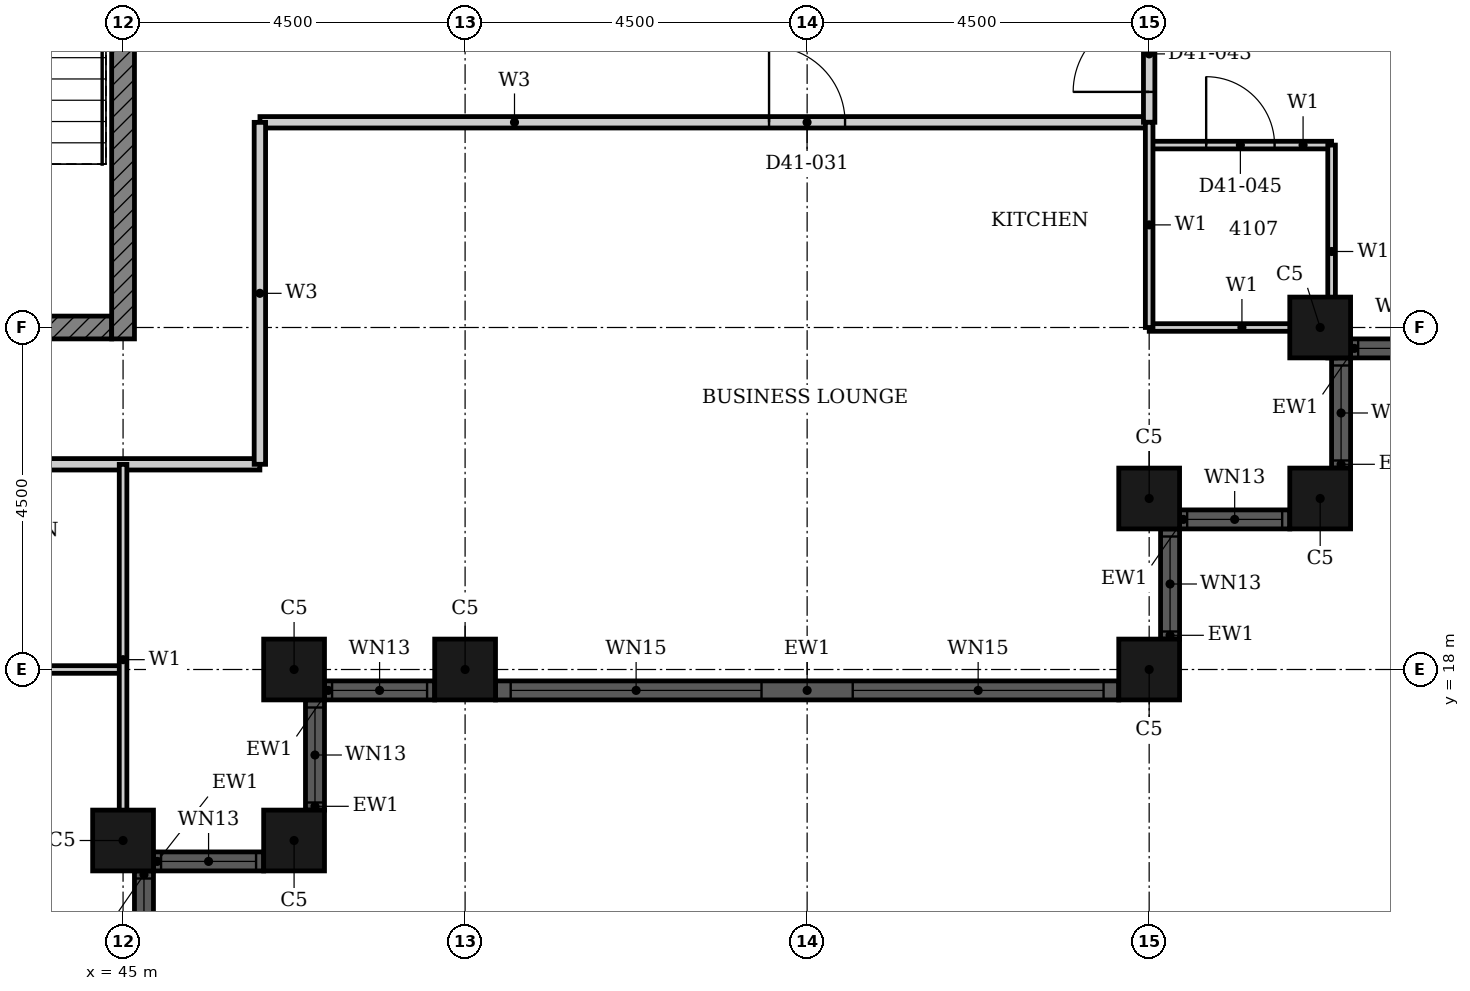
"""IFC4 building model, lengths in metres.
Left out: names, types, materials, properties, quantities, classifications, styles, units other than length and angle.
Written with IfcOpenShell. Run it as: python <this file> out.ifc"""

import sys

from ifc_helpers import new_model, si_unit, direction, frame, frame_2d, origin, origin_2d, place, context, subcontext, project, spatial, rectangle, hollow_rectangle, extrude, element, fill, save


model = new_model("IFC4")
c1 = context("Model", 3, precision=1e-05, world=origin(), true_north=direction((0.0, 1.0)))
c2 = subcontext(c1, "Body", "Model", "MODEL_VIEW")
j1 = project(units=[si_unit("LENGTHUNIT", "METRE"), si_unit("PLANEANGLEUNIT", "RADIAN")], contexts=[c1])
p1 = place(None, origin())
s1 = spatial("IfcSite", under=j1, at=p1, CompositionType="ELEMENT")
p2 = place(p1, origin())
s2 = spatial("IfcBuilding", under=s1, at=p2, CompositionType="ELEMENT")
p3 = place(p2, frame((0.0, 0.0, 165.4)))
s3 = spatial("IfcBuildingStorey", under=s2, at=p3, CompositionType="ELEMENT", Elevation=165.4)
for number, where, z_axis, x_axis in (
    (1, (45.0, 15.75, 0.0), (0.0, 0.0, 1.0), (1.0, 0.0, 0.0)),
    (2, (47.25, 15.75, 0.0), (0.0, 0.0, 1.0), (1.0, 0.0, 0.0)),
    (3, (47.25, 18.0, 0.0), (0.0, 0.0, 1.0), (1.0, 0.0, 0.0)),
    (4, (49.5, 18.0, 0.0), (0.0, 0.0, 1.0), (1.0, 0.0, 0.0)),
    (5, (58.5, 18.0, 0.0), (0.0, 0.0, 1.0), (1.0, 0.0, 0.0)),
    (6, (58.5, 20.25, 0.0), (0.0, 0.0, 1.0), (1.0, 0.0, 0.0)),
    (7, (60.75, 20.25, 0.0), (0.0, 0.0, 1.0), (1.0, 0.0, 0.0)),
    (8, (60.75, 22.5, 0.0), (0.0, 0.0, 1.0), (1.0, 0.0, 0.0)),
):
    element("IfcColumn", number, at=place(p3, frame(where, z_axis=z_axis, x_axis=x_axis)), inside=s3, PredefinedType="COLUMN", context=c2, shape_type="SweptSolid", body=[
        extrude(hollow_rectangle(XDim=0.8, YDim=0.8, WallThickness=0.025, at=origin_2d()), origin(), (0.0, 0.0, 1.0), 3.7),
    ])
p4 = place(p3, frame((45.275, 13.9, 0.0), z_axis=(0.0, 0.0, 1.0), x_axis=(0.0, 1.0, 0.0)))
e9 = element("IfcWall", 9, at=p4, inside=s3, PredefinedType="SOLIDWALL", context=c2, shape_type="SweptSolid", body=[
    extrude(rectangle(XDim=1.45, YDim=0.25, at=frame_2d((0.725, 0.0))), origin(), (0.0, 0.0, 1.0), 3.7),
])
p5 = place(p4, frame((0.1, 0.0, 0.9)))
e10 = element("IfcOpeningElement", 10, at=p5, cuts=e9, PredefinedType="OPENING", context=c2, shape_type="SweptSolid", body=[
    extrude(rectangle(XDim=1.25, YDim=1.85, at=frame_2d((0.625, 0.925))), frame((0.0, 0.135, 0.0), z_axis=(0.0, -1.0, 0.0), x_axis=(1.0, 0.0, 0.0)), (0.0, 0.0, 1.0), 0.27),
])
p6 = place(p3, frame((45.4, 15.475, 0.0), z_axis=(0.0, 0.0, 1.0), x_axis=(1.0, 0.0, 0.0)))
e11 = element("IfcWall", 11, at=p6, inside=s3, PredefinedType="SOLIDWALL", context=c2, shape_type="SweptSolid", body=[
    extrude(rectangle(XDim=1.45, YDim=0.25, at=frame_2d((0.725, 0.0))), origin(), (0.0, 0.0, 1.0), 3.7),
])
p7 = place(p6, frame((0.1, 0.0, 0.9)))
e12 = element("IfcOpeningElement", 12, at=p7, cuts=e11, PredefinedType="OPENING", context=c2, shape_type="SweptSolid", body=[
    extrude(rectangle(XDim=1.25, YDim=1.85, at=frame_2d((0.625, 0.925))), frame((0.0, 0.135, 0.0), z_axis=(0.0, -1.0, 0.0), x_axis=(1.0, 0.0, 0.0)), (0.0, 0.0, 1.0), 0.27),
])
p8 = place(p3, frame((47.525, 16.15, 0.0), z_axis=(0.0, 0.0, 1.0), x_axis=(0.0, 1.0, 0.0)))
e13 = element("IfcWall", 13, at=p8, inside=s3, PredefinedType="SOLIDWALL", context=c2, shape_type="SweptSolid", body=[
    extrude(rectangle(XDim=1.45, YDim=0.25, at=frame_2d((0.725, 0.0))), origin(), (0.0, 0.0, 1.0), 3.7),
])
p9 = place(p8, frame((0.1, 0.0, 0.9)))
e14 = element("IfcOpeningElement", 14, at=p9, cuts=e13, PredefinedType="OPENING", context=c2, shape_type="SweptSolid", body=[
    extrude(rectangle(XDim=1.25, YDim=1.85, at=frame_2d((0.625, 0.925))), frame((0.0, 0.135, 0.0), z_axis=(0.0, -1.0, 0.0), x_axis=(1.0, 0.0, 0.0)), (0.0, 0.0, 1.0), 0.27),
])
p10 = place(p3, frame((47.65, 17.725, 0.0), z_axis=(0.0, 0.0, 1.0), x_axis=(1.0, 0.0, 0.0)))
e15 = element("IfcWall", 15, at=p10, inside=s3, PredefinedType="SOLIDWALL", context=c2, shape_type="SweptSolid", body=[
    extrude(rectangle(XDim=1.45, YDim=0.25, at=frame_2d((0.725, 0.0))), origin(), (0.0, 0.0, 1.0), 3.7),
])
p11 = place(p10, frame((0.1, 0.0, 0.9)))
e16 = element("IfcOpeningElement", 16, at=p11, cuts=e15, PredefinedType="OPENING", context=c2, shape_type="SweptSolid", body=[
    extrude(rectangle(XDim=1.25, YDim=1.85, at=frame_2d((0.625, 0.925))), frame((0.0, 0.135, 0.0), z_axis=(0.0, -1.0, 0.0), x_axis=(1.0, 0.0, 0.0)), (0.0, 0.0, 1.0), 0.27),
])
p12 = place(p3, frame((49.9, 17.725, 0.0), z_axis=(0.0, 0.0, 1.0), x_axis=(1.0, 0.0, 0.0)))
e17 = element("IfcWall", 17, at=p12, inside=s3, PredefinedType="SOLIDWALL", context=c2, shape_type="SweptSolid", body=[
    extrude(rectangle(XDim=8.2, YDim=0.25, at=frame_2d((4.1, 0.0))), origin(), (0.0, 0.0, 1.0), 3.7),
])
p13 = place(p12, frame((0.2, 0.0, 0.45)))
e18 = element("IfcOpeningElement", 18, at=p13, cuts=e17, PredefinedType="OPENING", context=c2, shape_type="SweptSolid", body=[
    extrude(rectangle(XDim=3.3, YDim=2.3, at=frame_2d((1.65, 1.15))), frame((0.0, 0.135, 0.0), z_axis=(0.0, -1.0, 0.0), x_axis=(1.0, 0.0, 0.0)), (0.0, 0.0, 1.0), 0.27),
])
p14 = place(p12, frame((4.7, 0.0, 0.45)))
e19 = element("IfcOpeningElement", 19, at=p14, cuts=e17, PredefinedType="OPENING", context=c2, shape_type="SweptSolid", body=[
    extrude(rectangle(XDim=3.3, YDim=2.3, at=frame_2d((1.65, 1.15))), frame((0.0, 0.135, 0.0), z_axis=(0.0, -1.0, 0.0), x_axis=(1.0, 0.0, 0.0)), (0.0, 0.0, 1.0), 0.27),
])
p15 = place(p3, frame((58.775, 18.4, 0.0), z_axis=(0.0, 0.0, 1.0), x_axis=(0.0, 1.0, 0.0)))
e20 = element("IfcWall", 20, at=p15, inside=s3, PredefinedType="SOLIDWALL", context=c2, shape_type="SweptSolid", body=[
    extrude(rectangle(XDim=1.45, YDim=0.25, at=frame_2d((0.725, 0.0))), origin(), (0.0, 0.0, 1.0), 3.7),
])
p16 = place(p15, frame((0.1, 0.0, 0.9)))
e21 = element("IfcOpeningElement", 21, at=p16, cuts=e20, PredefinedType="OPENING", context=c2, shape_type="SweptSolid", body=[
    extrude(rectangle(XDim=1.25, YDim=1.85, at=frame_2d((0.625, 0.925))), frame((0.0, 0.135, 0.0), z_axis=(0.0, -1.0, 0.0), x_axis=(1.0, 0.0, 0.0)), (0.0, 0.0, 1.0), 0.27),
])
p17 = place(p3, frame((58.9, 19.975, 0.0), z_axis=(0.0, 0.0, 1.0), x_axis=(1.0, 0.0, 0.0)))
e22 = element("IfcWall", 22, at=p17, inside=s3, PredefinedType="SOLIDWALL", context=c2, shape_type="SweptSolid", body=[
    extrude(rectangle(XDim=1.45, YDim=0.25, at=frame_2d((0.725, 0.0))), origin(), (0.0, 0.0, 1.0), 3.7),
])
p18 = place(p17, frame((0.1, 0.0, 0.9)))
e23 = element("IfcOpeningElement", 23, at=p18, cuts=e22, PredefinedType="OPENING", context=c2, shape_type="SweptSolid", body=[
    extrude(rectangle(XDim=1.25, YDim=1.85, at=frame_2d((0.625, 0.925))), frame((0.0, 0.135, 0.0), z_axis=(0.0, -1.0, 0.0), x_axis=(1.0, 0.0, 0.0)), (0.0, 0.0, 1.0), 0.27),
])
p19 = place(p3, frame((61.025, 20.65, 0.0), z_axis=(0.0, 0.0, 1.0), x_axis=(0.0, 1.0, 0.0)))
e24 = element("IfcWall", 24, at=p19, inside=s3, PredefinedType="SOLIDWALL", context=c2, shape_type="SweptSolid", body=[
    extrude(rectangle(XDim=1.45, YDim=0.25, at=frame_2d((0.725, 0.0))), origin(), (0.0, 0.0, 1.0), 3.7),
])
p20 = place(p19, frame((0.1, 0.0, 0.9)))
e25 = element("IfcOpeningElement", 25, at=p20, cuts=e24, PredefinedType="OPENING", context=c2, shape_type="SweptSolid", body=[
    extrude(rectangle(XDim=1.25, YDim=1.85, at=frame_2d((0.625, 0.925))), frame((0.0, 0.135, 0.0), z_axis=(0.0, -1.0, 0.0), x_axis=(1.0, 0.0, 0.0)), (0.0, 0.0, 1.0), 0.27),
])
p21 = place(p3, frame((61.15, 22.225, 0.0), z_axis=(0.0, 0.0, 1.0), x_axis=(1.0, 0.0, 0.0)))
e26 = element("IfcWall", 26, at=p21, inside=s3, PredefinedType="SOLIDWALL", context=c2, shape_type="SweptSolid", body=[
    extrude(rectangle(XDim=1.45, YDim=0.25, at=frame_2d((0.725, 0.0))), origin(), (0.0, 0.0, 1.0), 3.7),
])
p22 = place(p21, frame((0.1, 0.0, 0.9)))
e27 = element("IfcOpeningElement", 27, at=p22, cuts=e26, PredefinedType="OPENING", context=c2, shape_type="SweptSolid", body=[
    extrude(rectangle(XDim=1.25, YDim=1.85, at=frame_2d((0.625, 0.925))), frame((0.0, 0.135, 0.0), z_axis=(0.0, -1.0, 0.0), x_axis=(1.0, 0.0, 0.0)), (0.0, 0.0, 1.0), 0.27),
])
p23 = place(p3, frame((32.911, 22.5, 0.0), z_axis=(0.0, 0.0, 1.0), x_axis=(1.0, 0.0, 0.0)))
e28 = element("IfcWall", 28, at=p23, inside=s3, PredefinedType="SHEAR", context=c2, shape_type="SweptSolid", body=[
    extrude(rectangle(XDim=11.939, YDim=0.3, at=frame_2d((5.97, 0.0))), origin(), (0.0, 0.0, 1.0), 3.4),
])
p24 = place(p23, frame((5.404, 0.0, 0.0)))
e29 = element("IfcOpeningElement", 29, at=p24, cuts=e28, PredefinedType="OPENING", context=c2, shape_type="SweptSolid", body=[
    extrude(rectangle(XDim=1.8, YDim=2.1, at=frame_2d((0.9, 1.05))), frame((0.0, 0.16, 0.0), z_axis=(0.0, -1.0, 0.0), x_axis=(1.0, 0.0, 0.0)), (0.0, 0.0, 1.0), 0.32),
])
p25 = place(p3, frame((45.0, 22.35, 0.0), z_axis=(0.0, 0.0, 1.0), x_axis=(0.0, 1.0, 0.0)))
e30 = element("IfcWall", 30, at=p25, inside=s3, PredefinedType="SHEAR", context=c2, shape_type="SweptSolid", body=[
    extrude(rectangle(XDim=9.3, YDim=0.3, at=frame_2d((4.65, 0.0))), origin(), (0.0, 0.0, 1.0), 3.4),
])
p26 = place(p3, frame((38.4, 20.7, 0.0), z_axis=(0.0, 0.0, 1.0), x_axis=(1.0, 0.0, 0.0)))
e31 = element("IfcWall", 31, at=p26, inside=s3, PredefinedType="PARTITIONING", context=c2, shape_type="SweptSolid", body=[
    extrude(rectangle(XDim=8.4, YDim=0.15, at=frame_2d((4.2, 0.0))), origin(), (0.0, 0.0, 1.0), 3.4),
])
p27 = place(p3, frame((46.801, 25.2, 0.0), z_axis=(0.0, 0.0, 1.0), x_axis=(1.0, 0.0, 0.0)))
e32 = element("IfcWall", 32, at=p27, inside=s3, PredefinedType="PARTITIONING", context=c2, shape_type="SweptSolid", body=[
    extrude(rectangle(XDim=11.699, YDim=0.15, at=frame_2d((5.85, 0.0))), origin(), (0.0, 0.0, 1.0), 3.4),
])
p28 = place(p27, frame((6.698, 0.0, 0.0)))
e33 = element("IfcOpeningElement", 33, at=p28, cuts=e32, PredefinedType="OPENING", context=c2, shape_type="SweptSolid", body=[
    extrude(rectangle(XDim=1.0, YDim=2.1, at=frame_2d((0.5, 1.05))), frame((0.0, 0.085, 0.0), z_axis=(0.0, -1.0, 0.0), x_axis=(1.0, 0.0, 0.0)), (0.0, 0.0, 1.0), 0.17),
])
p29 = place(p3, frame((46.8, 20.7, 0.0), z_axis=(0.0, 0.0, 1.0), x_axis=(0.0, 1.0, 0.0)))
e34 = element("IfcWall", 34, at=p29, inside=s3, PredefinedType="PARTITIONING", context=c2, shape_type="SweptSolid", body=[
    extrude(rectangle(XDim=4.499, YDim=0.15, at=frame_2d((2.25, 0.0))), origin(), (0.0, 0.0, 1.0), 3.4),
])
p30 = place(p3, frame((58.5, 25.2, 0.0), z_axis=(0.0, 0.0, 1.0), x_axis=(0.0, 1.0, 0.0)))
e35 = element("IfcWall", 35, at=p30, inside=s3, PredefinedType="PARTITIONING", context=c2, shape_type="SweptSolid", body=[
    extrude(rectangle(XDim=1.8, YDim=0.15, at=frame_2d((0.9, 0.0))), origin(), (0.0, 0.0, 1.0), 3.4),
])
p31 = place(p30, frame((0.4, 0.0, 0.0)))
e36 = element("IfcOpeningElement", 36, at=p31, cuts=e35, PredefinedType="OPENING", context=c2, shape_type="SweptSolid", body=[
    extrude(rectangle(XDim=1.0, YDim=2.2, at=frame_2d((0.5, 1.1))), frame((0.0, 0.085, 0.0), z_axis=(0.0, -1.0, 0.0), x_axis=(1.0, 0.0, 0.0)), (0.0, 0.0, 1.0), 0.17),
])
p32 = place(p3, frame((42.0, 18.0, 0.0), z_axis=(0.0, 0.0, 1.0), x_axis=(1.0, 0.0, 0.0)))
e37 = element("IfcWall", 37, at=p32, inside=s3, PredefinedType="PARTITIONING", context=c2, shape_type="SweptSolid", body=[
    extrude(rectangle(XDim=3.0, YDim=0.1, at=frame_2d((1.5, 0.0))), origin(), (0.0, 0.0, 1.0), 3.4),
])
p33 = place(p32, frame((1.05, 0.0, 0.0)))
e38 = element("IfcOpeningElement", 38, at=p33, cuts=e37, PredefinedType="OPENING", context=c2, shape_type="SweptSolid", body=[
    extrude(rectangle(XDim=0.9, YDim=2.1, at=frame_2d((0.45, 1.05))), frame((0.0, 0.06, 0.0), z_axis=(0.0, -1.0, 0.0), x_axis=(1.0, 0.0, 0.0)), (0.0, 0.0, 1.0), 0.12),
])
p34 = place(p3, frame((58.501, 22.5, 0.0), z_axis=(0.0, 0.0, 1.0), x_axis=(1.0, 0.0, 0.0)))
e39 = element("IfcWall", 39, at=p34, inside=s3, PredefinedType="PARTITIONING", context=c2, shape_type="SweptSolid", body=[
    extrude(rectangle(XDim=2.439, YDim=0.1, at=frame_2d((1.219, 0.0))), origin(), (0.0, 0.0, 1.0), 2.68),
])
p35 = place(p3, frame((58.5, 24.9, 0.0), z_axis=(0.0, 0.0, 1.0), x_axis=(1.0, 0.0, 0.0)))
e40 = element("IfcWall", 40, at=p35, inside=s3, PredefinedType="PARTITIONING", context=c2, shape_type="SweptSolid", body=[
    extrude(rectangle(XDim=2.4, YDim=0.1, at=frame_2d((1.2, 0.0))), origin(), (0.0, 0.0, 1.0), 3.4),
])
p36 = place(p35, frame((0.75, 0.0, 0.0)))
e41 = element("IfcOpeningElement", 41, at=p36, cuts=e40, PredefinedType="OPENING", context=c2, shape_type="SweptSolid", body=[
    extrude(rectangle(XDim=0.9, YDim=2.1, at=frame_2d((0.45, 1.05))), frame((0.0, 0.06, 0.0), z_axis=(0.0, -1.0, 0.0), x_axis=(1.0, 0.0, 0.0)), (0.0, 0.0, 1.0), 0.12),
])
p37 = place(p3, frame((45.0, 15.56, 0.0), z_axis=(0.0, 0.0, 1.0), x_axis=(0.0, 1.0, 0.0)))
e42 = element("IfcWall", 42, at=p37, inside=s3, PredefinedType="PARTITIONING", context=c2, shape_type="SweptSolid", body=[
    extrude(rectangle(XDim=5.139, YDim=0.1, at=frame_2d((2.569, 0.0))), origin(), (0.0, 0.0, 1.0), 3.4),
])
p38 = place(p3, frame((58.5, 22.5, 0.0), z_axis=(0.0, 0.0, 1.0), x_axis=(0.0, 1.0, 0.0)))
e43 = element("IfcWall", 43, at=p38, inside=s3, PredefinedType="PARTITIONING", context=c2, shape_type="SweptSolid", body=[
    extrude(rectangle(XDim=2.7, YDim=0.1, at=frame_2d((1.35, 0.0))), origin(), (0.0, 0.0, 1.0), 3.4),
])
p39 = place(p3, frame((60.9, 22.1, 0.0), z_axis=(0.0, 0.0, 1.0), x_axis=(0.0, 1.0, 0.0)))
e44 = element("IfcWall", 44, at=p39, inside=s3, PredefinedType="PARTITIONING", context=c2, shape_type="SweptSolid", body=[
    extrude(rectangle(XDim=2.8, YDim=0.1, at=frame_2d((1.4, 0.0))), origin(), (0.0, 0.0, 1.0), 3.4),
])
p40 = place(p5, origin())
e45 = element("IfcWindow", 45, at=p40, inside=s3, PartitioningType="SINGLE_PANEL", PredefinedType="WINDOW", context=c2, shape_type="SweptSolid", body=[
    extrude(rectangle(XDim=1.25, YDim=1.85, at=frame_2d((0.625, 0.925))), frame((0.0, 0.03, 0.0), z_axis=(0.0, -1.0, 0.0), x_axis=(1.0, 0.0, 0.0)), (0.0, 0.0, 1.0), 0.06),
])
fill(e10, e45)
p41 = place(p7, origin())
e46 = element("IfcWindow", 46, at=p41, inside=s3, PartitioningType="SINGLE_PANEL", PredefinedType="WINDOW", context=c2, shape_type="SweptSolid", body=[
    extrude(rectangle(XDim=1.25, YDim=1.85, at=frame_2d((0.625, 0.925))), frame((0.0, 0.03, 0.0), z_axis=(0.0, -1.0, 0.0), x_axis=(1.0, 0.0, 0.0)), (0.0, 0.0, 1.0), 0.06),
])
fill(e12, e46)
p42 = place(p9, origin())
e47 = element("IfcWindow", 47, at=p42, inside=s3, PartitioningType="SINGLE_PANEL", PredefinedType="WINDOW", context=c2, shape_type="SweptSolid", body=[
    extrude(rectangle(XDim=1.25, YDim=1.85, at=frame_2d((0.625, 0.925))), frame((0.0, 0.03, 0.0), z_axis=(0.0, -1.0, 0.0), x_axis=(1.0, 0.0, 0.0)), (0.0, 0.0, 1.0), 0.06),
])
fill(e14, e47)
p43 = place(p11, origin())
e48 = element("IfcWindow", 48, at=p43, inside=s3, PartitioningType="SINGLE_PANEL", PredefinedType="WINDOW", context=c2, shape_type="SweptSolid", body=[
    extrude(rectangle(XDim=1.25, YDim=1.85, at=frame_2d((0.625, 0.925))), frame((0.0, 0.03, 0.0), z_axis=(0.0, -1.0, 0.0), x_axis=(1.0, 0.0, 0.0)), (0.0, 0.0, 1.0), 0.06),
])
fill(e16, e48)
p44 = place(p13, origin())
e49 = element("IfcWindow", 49, at=p44, inside=s3, PartitioningType="SINGLE_PANEL", PredefinedType="WINDOW", context=c2, shape_type="SweptSolid", body=[
    extrude(rectangle(XDim=3.3, YDim=2.3, at=frame_2d((1.65, 1.15))), frame((0.0, 0.03, 0.0), z_axis=(0.0, -1.0, 0.0), x_axis=(1.0, 0.0, 0.0)), (0.0, 0.0, 1.0), 0.06),
])
fill(e18, e49)
p45 = place(p14, origin())
e50 = element("IfcWindow", 50, at=p45, inside=s3, PartitioningType="SINGLE_PANEL", PredefinedType="WINDOW", context=c2, shape_type="SweptSolid", body=[
    extrude(rectangle(XDim=3.3, YDim=2.3, at=frame_2d((1.65, 1.15))), frame((0.0, 0.03, 0.0), z_axis=(0.0, -1.0, 0.0), x_axis=(1.0, 0.0, 0.0)), (0.0, 0.0, 1.0), 0.06),
])
fill(e19, e50)
p46 = place(p16, origin())
e51 = element("IfcWindow", 51, at=p46, inside=s3, PartitioningType="SINGLE_PANEL", PredefinedType="WINDOW", context=c2, shape_type="SweptSolid", body=[
    extrude(rectangle(XDim=1.25, YDim=1.85, at=frame_2d((0.625, 0.925))), frame((0.0, 0.03, 0.0), z_axis=(0.0, -1.0, 0.0), x_axis=(1.0, 0.0, 0.0)), (0.0, 0.0, 1.0), 0.06),
])
fill(e21, e51)
p47 = place(p18, origin())
e52 = element("IfcWindow", 52, at=p47, inside=s3, PartitioningType="SINGLE_PANEL", PredefinedType="WINDOW", context=c2, shape_type="SweptSolid", body=[
    extrude(rectangle(XDim=1.25, YDim=1.85, at=frame_2d((0.625, 0.925))), frame((0.0, 0.03, 0.0), z_axis=(0.0, -1.0, 0.0), x_axis=(1.0, 0.0, 0.0)), (0.0, 0.0, 1.0), 0.06),
])
fill(e23, e52)
p48 = place(p20, origin())
e53 = element("IfcWindow", 53, at=p48, inside=s3, PartitioningType="SINGLE_PANEL", PredefinedType="WINDOW", context=c2, shape_type="SweptSolid", body=[
    extrude(rectangle(XDim=1.25, YDim=1.85, at=frame_2d((0.625, 0.925))), frame((0.0, 0.03, 0.0), z_axis=(0.0, -1.0, 0.0), x_axis=(1.0, 0.0, 0.0)), (0.0, 0.0, 1.0), 0.06),
])
fill(e25, e53)
p49 = place(p22, origin())
e54 = element("IfcWindow", 54, at=p49, inside=s3, PartitioningType="SINGLE_PANEL", PredefinedType="WINDOW", context=c2, shape_type="SweptSolid", body=[
    extrude(rectangle(XDim=1.25, YDim=1.85, at=frame_2d((0.625, 0.925))), frame((0.0, 0.03, 0.0), z_axis=(0.0, -1.0, 0.0), x_axis=(1.0, 0.0, 0.0)), (0.0, 0.0, 1.0), 0.06),
])
fill(e27, e54)
p50 = place(p28, origin())
e55 = element("IfcDoor", 55, at=p50, inside=s3, OperationType="SINGLE_SWING_LEFT", PredefinedType="DOOR", context=c2, shape_type="SweptSolid", body=[
    extrude(rectangle(XDim=1.0, YDim=2.1, at=frame_2d((0.5, 1.05))), frame((0.0, 0.025, 0.0), z_axis=(0.0, -1.0, 0.0), x_axis=(1.0, 0.0, 0.0)), (0.0, 0.0, 1.0), 0.05),
])
fill(e33, e55)
p51 = place(p31, origin())
e56 = element("IfcDoor", 56, at=p51, inside=s3, OperationType="SINGLE_SWING_LEFT", PredefinedType="DOOR", context=c2, shape_type="SweptSolid", body=[
    extrude(rectangle(XDim=1.0, YDim=2.2, at=frame_2d((0.5, 1.1))), frame((0.0, 0.025, 0.0), z_axis=(0.0, -1.0, 0.0), x_axis=(1.0, 0.0, 0.0)), (0.0, 0.0, 1.0), 0.05),
])
fill(e36, e56)
p52 = place(p36, origin())
e57 = element("IfcDoor", 57, at=p52, inside=s3, OperationType="SINGLE_SWING_RIGHT", PredefinedType="DOOR", context=c2, shape_type="SweptSolid", body=[
    extrude(rectangle(XDim=0.9, YDim=2.1, at=frame_2d((0.45, 1.05))), frame((0.0, 0.025, 0.0), z_axis=(0.0, -1.0, 0.0), x_axis=(1.0, 0.0, 0.0)), (0.0, 0.0, 1.0), 0.05),
])
fill(e41, e57)
save(model, sys.argv[1])
